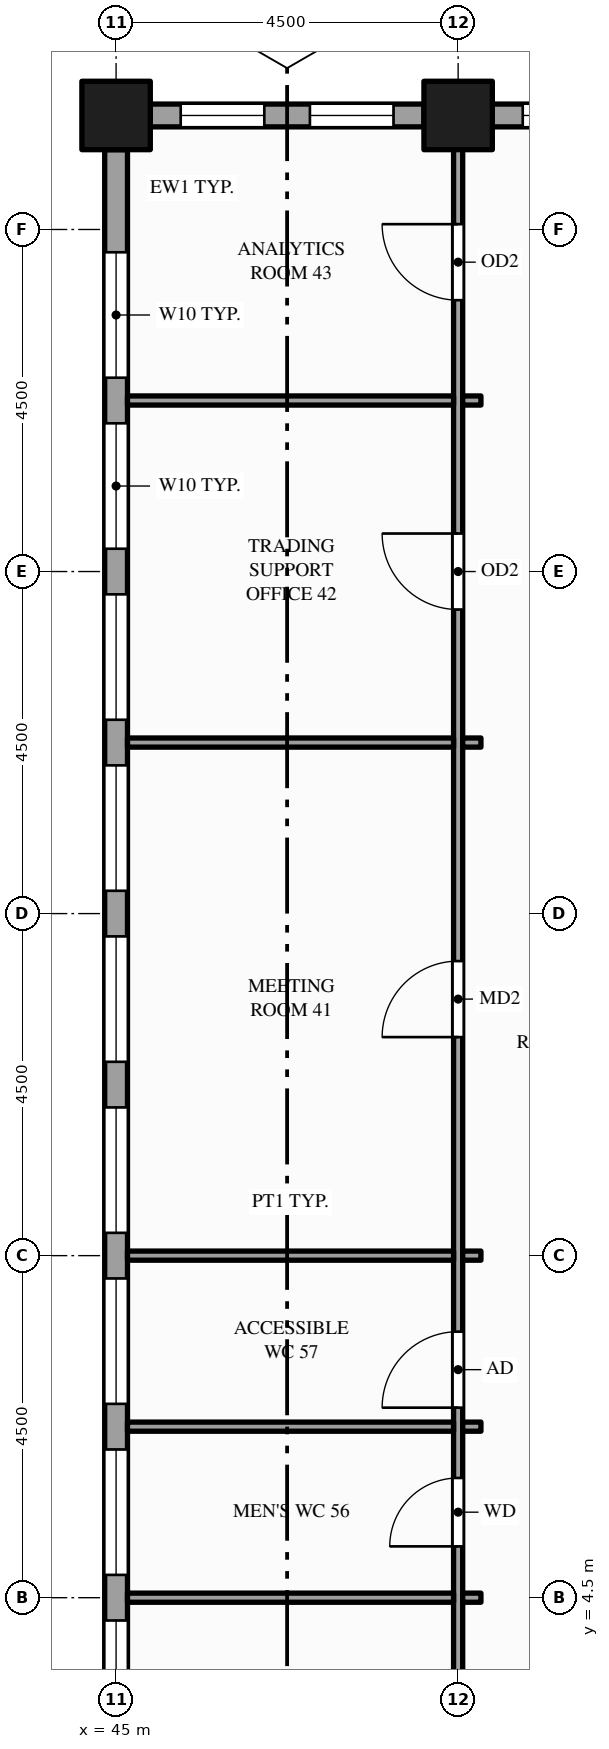
"""IFC4 building model, lengths in metres.
Left out: names, types, materials, properties, quantities, classifications, styles, units other than length and angle.
Written with IfcOpenShell. Run it as: python <this file> out.ifc"""

import sys

from ifc_helpers import new_model, si_unit, direction, frame, frame_2d, origin, origin_2d, place, context, subcontext, project, spatial, rectangle, hollow_rectangle, extrude, element, fill, save


model = new_model("IFC4")
c1 = context("Model", 3, precision=1e-05, world=origin(), true_north=direction((0.0, 1.0)))
c2 = subcontext(c1, "Body", "Model", "MODEL_VIEW")
j1 = project(units=[si_unit("LENGTHUNIT", "METRE"), si_unit("PLANEANGLEUNIT", "RADIAN")], contexts=[c1])
p1 = place(None, origin())
s1 = spatial("IfcSite", under=j1, at=p1, CompositionType="ELEMENT")
p2 = place(p1, origin())
s2 = spatial("IfcBuilding", under=s1, at=p2, CompositionType="ELEMENT")
p3 = place(p2, frame((0.0, 0.0, 143.0)))
s3 = spatial("IfcBuildingStorey", under=s2, at=p3, CompositionType="ELEMENT", Elevation=143.0)
for number, where, z_axis, x_axis in (
    (1, (45.0, 24.0, -0.15), (0.0, 0.0, 1.0), (1.0, 0.0, 0.0)),
    (2, (49.5, 24.0, -0.15), (0.0, 0.0, 1.0), (1.0, 0.0, 0.0)),
):
    element("IfcColumn", number, at=place(p3, frame(where, z_axis=z_axis, x_axis=x_axis)), inside=s3, PredefinedType="COLUMN", context=c2, shape_type="SweptSolid", body=[
        extrude(hollow_rectangle(XDim=0.9, YDim=0.9, WallThickness=0.045, at=origin_2d()), origin(), (0.0, 0.0, 1.0), 4.0),
    ])
p4 = place(p3, frame((53.55, 24.0, 0.0), z_axis=(0.0, 0.0, 1.0), x_axis=(-1.0, 0.0, 0.0)))
e3 = element("IfcWall", 3, at=p4, inside=s3, PredefinedType="STANDARD", context=c2, shape_type="SweptSolid", body=[
    extrude(rectangle(XDim=3.6, YDim=0.3, at=frame_2d((1.8, 0.0))), origin(), (0.0, 0.0, 1.0), 2.87),
])
p5 = place(p4, frame((0.4, 0.0, 0.9)))
e4 = element("IfcOpeningElement", 4, at=p5, cuts=e3, PredefinedType="OPENING", context=c2, shape_type="SweptSolid", body=[
    extrude(rectangle(XDim=1.1, YDim=1.75, at=frame_2d((0.55, 0.875))), frame((0.0, 0.16, 0.0), z_axis=(0.0, -1.0, 0.0), x_axis=(1.0, 0.0, 0.0)), (0.0, 0.0, 1.0), 0.32),
])
p6 = place(p4, frame((2.1, 0.0, 0.9)))
e5 = element("IfcOpeningElement", 5, at=p6, cuts=e3, PredefinedType="OPENING", context=c2, shape_type="SweptSolid", body=[
    extrude(rectangle(XDim=1.1, YDim=1.75, at=frame_2d((0.55, 0.875))), frame((0.0, 0.16, 0.0), z_axis=(0.0, -1.0, 0.0), x_axis=(1.0, 0.0, 0.0)), (0.0, 0.0, 1.0), 0.32),
])
p7 = place(p3, frame((49.05, 24.0, 0.0), z_axis=(0.0, 0.0, 1.0), x_axis=(-1.0, 0.0, 0.0)))
e6 = element("IfcWall", 6, at=p7, inside=s3, PredefinedType="STANDARD", context=c2, shape_type="SweptSolid", body=[
    extrude(rectangle(XDim=3.6, YDim=0.3, at=frame_2d((1.8, 0.0))), origin(), (0.0, 0.0, 1.0), 2.87),
])
p8 = place(p7, frame((0.4, 0.0, 0.9)))
e7 = element("IfcOpeningElement", 7, at=p8, cuts=e6, PredefinedType="OPENING", context=c2, shape_type="SweptSolid", body=[
    extrude(rectangle(XDim=1.1, YDim=1.75, at=frame_2d((0.55, 0.875))), frame((0.0, 0.16, 0.0), z_axis=(0.0, -1.0, 0.0), x_axis=(1.0, 0.0, 0.0)), (0.0, 0.0, 1.0), 0.32),
])
p9 = place(p7, frame((2.1, 0.0, 0.9)))
e8 = element("IfcOpeningElement", 8, at=p9, cuts=e6, PredefinedType="OPENING", context=c2, shape_type="SweptSolid", body=[
    extrude(rectangle(XDim=1.1, YDim=1.75, at=frame_2d((0.55, 0.875))), frame((0.0, 0.16, 0.0), z_axis=(0.0, -1.0, 0.0), x_axis=(1.0, 0.0, 0.0)), (0.0, 0.0, 1.0), 0.32),
])
p10 = place(p3, frame((45.0, 23.55, 0.0), z_axis=(0.0, 0.0, 1.0), x_axis=(0.0, -1.0, 0.0)))
e9 = element("IfcWall", 9, at=p10, inside=s3, PredefinedType="STANDARD", context=c2, shape_type="SweptSolid", body=[
    extrude(rectangle(XDim=21.6, YDim=0.3, at=frame_2d((10.8, 0.0))), origin(), (0.0, 0.0, 1.0), 3.149),
])
p11 = place(p10, frame((1.35, 0.0, 0.9)))
e10 = element("IfcOpeningElement", 10, at=p11, cuts=e9, PredefinedType="OPENING", context=c2, shape_type="SweptSolid", body=[
    extrude(rectangle(XDim=1.65, YDim=2.0, at=frame_2d((0.825, 1.0))), frame((0.0, 0.16, 0.0), z_axis=(0.0, -1.0, 0.0), x_axis=(1.0, 0.0, 0.0)), (0.0, 0.0, 1.0), 0.32),
])
p12 = place(p10, frame((3.6, 0.0, 0.9)))
e11 = element("IfcOpeningElement", 11, at=p12, cuts=e9, PredefinedType="OPENING", context=c2, shape_type="SweptSolid", body=[
    extrude(rectangle(XDim=1.65, YDim=2.0, at=frame_2d((0.825, 1.0))), frame((0.0, 0.16, 0.0), z_axis=(0.0, -1.0, 0.0), x_axis=(1.0, 0.0, 0.0)), (0.0, 0.0, 1.0), 0.32),
])
p13 = place(p10, frame((5.85, 0.0, 0.9)))
e12 = element("IfcOpeningElement", 12, at=p13, cuts=e9, PredefinedType="OPENING", context=c2, shape_type="SweptSolid", body=[
    extrude(rectangle(XDim=1.65, YDim=2.0, at=frame_2d((0.825, 1.0))), frame((0.0, 0.16, 0.0), z_axis=(0.0, -1.0, 0.0), x_axis=(1.0, 0.0, 0.0)), (0.0, 0.0, 1.0), 0.32),
])
p14 = place(p10, frame((8.1, 0.0, 0.9)))
e13 = element("IfcOpeningElement", 13, at=p14, cuts=e9, PredefinedType="OPENING", context=c2, shape_type="SweptSolid", body=[
    extrude(rectangle(XDim=1.65, YDim=2.0, at=frame_2d((0.825, 1.0))), frame((0.0, 0.16, 0.0), z_axis=(0.0, -1.0, 0.0), x_axis=(1.0, 0.0, 0.0)), (0.0, 0.0, 1.0), 0.32),
])
p15 = place(p10, frame((10.35, 0.0, 0.9)))
e14 = element("IfcOpeningElement", 14, at=p15, cuts=e9, PredefinedType="OPENING", context=c2, shape_type="SweptSolid", body=[
    extrude(rectangle(XDim=1.65, YDim=2.0, at=frame_2d((0.825, 1.0))), frame((0.0, 0.16, 0.0), z_axis=(0.0, -1.0, 0.0), x_axis=(1.0, 0.0, 0.0)), (0.0, 0.0, 1.0), 0.32),
])
p16 = place(p10, frame((12.6, 0.0, 0.9)))
e15 = element("IfcOpeningElement", 15, at=p16, cuts=e9, PredefinedType="OPENING", context=c2, shape_type="SweptSolid", body=[
    extrude(rectangle(XDim=1.65, YDim=2.0, at=frame_2d((0.825, 1.0))), frame((0.0, 0.16, 0.0), z_axis=(0.0, -1.0, 0.0), x_axis=(1.0, 0.0, 0.0)), (0.0, 0.0, 1.0), 0.32),
])
p17 = place(p10, frame((14.85, 0.0, 0.9)))
e16 = element("IfcOpeningElement", 16, at=p17, cuts=e9, PredefinedType="OPENING", context=c2, shape_type="SweptSolid", body=[
    extrude(rectangle(XDim=1.65, YDim=2.0, at=frame_2d((0.825, 1.0))), frame((0.0, 0.16, 0.0), z_axis=(0.0, -1.0, 0.0), x_axis=(1.0, 0.0, 0.0)), (0.0, 0.0, 1.0), 0.32),
])
p18 = place(p10, frame((17.1, 0.0, 0.9)))
e17 = element("IfcOpeningElement", 17, at=p18, cuts=e9, PredefinedType="OPENING", context=c2, shape_type="SweptSolid", body=[
    extrude(rectangle(XDim=1.65, YDim=2.0, at=frame_2d((0.825, 1.0))), frame((0.0, 0.16, 0.0), z_axis=(0.0, -1.0, 0.0), x_axis=(1.0, 0.0, 0.0)), (0.0, 0.0, 1.0), 0.32),
])
p19 = place(p10, frame((19.35, 0.0, 0.9)))
e18 = element("IfcOpeningElement", 18, at=p19, cuts=e9, PredefinedType="OPENING", context=c2, shape_type="SweptSolid", body=[
    extrude(rectangle(XDim=1.65, YDim=2.0, at=frame_2d((0.825, 1.0))), frame((0.0, 0.16, 0.0), z_axis=(0.0, -1.0, 0.0), x_axis=(1.0, 0.0, 0.0)), (0.0, 0.0, 1.0), 0.32),
])
p20 = place(p3, frame((49.5, 1.65, 0.0), z_axis=(0.0, 0.0, 1.0), x_axis=(0.0, 1.0, 0.0)))
e19 = element("IfcWall", 19, at=p20, inside=s3, PredefinedType="PARTITIONING", context=c2, shape_type="SweptSolid", body=[
    extrude(rectangle(XDim=22.2, YDim=0.12, at=frame_2d((11.1, 0.0))), origin(), (0.0, 0.0, 1.0), 2.87),
])
p21 = place(p20, frame((0.85, 0.0, 0.0)))
e20 = element("IfcOpeningElement", 20, at=p21, cuts=e19, PredefinedType="OPENING", context=c2, shape_type="SweptSolid", body=[
    extrude(rectangle(XDim=0.9, YDim=2.1, at=frame_2d((0.45, 1.05))), frame((0.0, 0.07, 0.0), z_axis=(0.0, -1.0, 0.0), x_axis=(1.0, 0.0, 0.0)), (0.0, 0.0, 1.0), 0.14),
])
p22 = place(p20, frame((3.525, 0.0, 0.0)))
e21 = element("IfcOpeningElement", 21, at=p22, cuts=e19, PredefinedType="OPENING", context=c2, shape_type="SweptSolid", body=[
    extrude(rectangle(XDim=0.9, YDim=2.1, at=frame_2d((0.45, 1.05))), frame((0.0, 0.07, 0.0), z_axis=(0.0, -1.0, 0.0), x_axis=(1.0, 0.0, 0.0)), (0.0, 0.0, 1.0), 0.14),
])
p23 = place(p20, frame((5.35, 0.0, 0.0)))
e22 = element("IfcOpeningElement", 22, at=p23, cuts=e19, PredefinedType="OPENING", context=c2, shape_type="SweptSolid", body=[
    extrude(rectangle(XDim=1.0, YDim=2.1, at=frame_2d((0.5, 1.05))), frame((0.0, 0.07, 0.0), z_axis=(0.0, -1.0, 0.0), x_axis=(1.0, 0.0, 0.0)), (0.0, 0.0, 1.0), 0.14),
])
p24 = place(p20, frame((10.225, 0.0, 0.0)))
e23 = element("IfcOpeningElement", 23, at=p24, cuts=e19, PredefinedType="OPENING", context=c2, shape_type="SweptSolid", body=[
    extrude(rectangle(XDim=1.0, YDim=2.1, at=frame_2d((0.5, 1.05))), frame((0.0, 0.07, 0.0), z_axis=(0.0, -1.0, 0.0), x_axis=(1.0, 0.0, 0.0)), (0.0, 0.0, 1.0), 0.14),
])
p25 = place(p20, frame((15.85, 0.0, 0.0)))
e24 = element("IfcOpeningElement", 24, at=p25, cuts=e19, PredefinedType="OPENING", context=c2, shape_type="SweptSolid", body=[
    extrude(rectangle(XDim=1.0, YDim=2.1, at=frame_2d((0.5, 1.05))), frame((0.0, 0.07, 0.0), z_axis=(0.0, -1.0, 0.0), x_axis=(1.0, 0.0, 0.0)), (0.0, 0.0, 1.0), 0.14),
])
p26 = place(p20, frame((19.92, 0.0, 0.0)))
e25 = element("IfcOpeningElement", 25, at=p26, cuts=e19, PredefinedType="OPENING", context=c2, shape_type="SweptSolid", body=[
    extrude(rectangle(XDim=1.0, YDim=2.1, at=frame_2d((0.5, 1.05))), frame((0.0, 0.07, 0.0), z_axis=(0.0, -1.0, 0.0), x_axis=(1.0, 0.0, 0.0)), (0.0, 0.0, 1.0), 0.14),
])
p27 = place(p3, frame((45.15, 4.5, 0.0), z_axis=(0.0, 0.0, 1.0), x_axis=(1.0, 0.0, 0.0)))
e26 = element("IfcWall", 26, at=p27, inside=s3, PredefinedType="PARTITIONING", context=c2, shape_type="SweptSolid", body=[
    extrude(rectangle(XDim=4.29, YDim=0.12, at=frame_2d((2.145, 0.0))), origin(), (0.0, 0.0, 1.0), 2.87),
])
p28 = place(p3, frame((49.56, 4.5, 0.0), z_axis=(0.0, 0.0, 1.0), x_axis=(1.0, 0.0, 0.0)))
e27 = element("IfcWall", 27, at=p28, inside=s3, PredefinedType="PARTITIONING", context=c2, shape_type="SweptSolid", body=[
    extrude(rectangle(XDim=0.24, YDim=0.12, at=frame_2d((0.12, 0.0))), origin(), (0.0, 0.0, 1.0), 2.87),
])
p29 = place(p3, frame((45.15, 6.75, 0.0), z_axis=(0.0, 0.0, 1.0), x_axis=(1.0, 0.0, 0.0)))
e28 = element("IfcWall", 28, at=p29, inside=s3, PredefinedType="PARTITIONING", context=c2, shape_type="SweptSolid", body=[
    extrude(rectangle(XDim=4.29, YDim=0.12, at=frame_2d((2.145, 0.0))), origin(), (0.0, 0.0, 1.0), 2.87),
])
p30 = place(p3, frame((49.56, 6.75, 0.0), z_axis=(0.0, 0.0, 1.0), x_axis=(1.0, 0.0, 0.0)))
e29 = element("IfcWall", 29, at=p30, inside=s3, PredefinedType="PARTITIONING", context=c2, shape_type="SweptSolid", body=[
    extrude(rectangle(XDim=0.24, YDim=0.12, at=frame_2d((0.12, 0.0))), origin(), (0.0, 0.0, 1.0), 2.87),
])
p31 = place(p3, frame((45.15, 9.0, 0.0), z_axis=(0.0, 0.0, 1.0), x_axis=(1.0, 0.0, 0.0)))
e30 = element("IfcWall", 30, at=p31, inside=s3, PredefinedType="PARTITIONING", context=c2, shape_type="SweptSolid", body=[
    extrude(rectangle(XDim=4.29, YDim=0.12, at=frame_2d((2.145, 0.0))), origin(), (0.0, 0.0, 1.0), 2.87),
])
p32 = place(p3, frame((49.56, 9.0, 0.0), z_axis=(0.0, 0.0, 1.0), x_axis=(1.0, 0.0, 0.0)))
e31 = element("IfcWall", 31, at=p32, inside=s3, PredefinedType="PARTITIONING", context=c2, shape_type="SweptSolid", body=[
    extrude(rectangle(XDim=0.24, YDim=0.12, at=frame_2d((0.12, 0.0))), origin(), (0.0, 0.0, 1.0), 2.87),
])
p33 = place(p3, frame((45.15, 15.75, 0.0), z_axis=(0.0, 0.0, 1.0), x_axis=(1.0, 0.0, 0.0)))
e32 = element("IfcWall", 32, at=p33, inside=s3, PredefinedType="PARTITIONING", context=c2, shape_type="SweptSolid", body=[
    extrude(rectangle(XDim=4.29, YDim=0.12, at=frame_2d((2.145, 0.0))), origin(), (0.0, 0.0, 1.0), 2.87),
])
p34 = place(p3, frame((49.56, 15.75, 0.0), z_axis=(0.0, 0.0, 1.0), x_axis=(1.0, 0.0, 0.0)))
e33 = element("IfcWall", 33, at=p34, inside=s3, PredefinedType="PARTITIONING", context=c2, shape_type="SweptSolid", body=[
    extrude(rectangle(XDim=0.24, YDim=0.12, at=frame_2d((0.12, 0.0))), origin(), (0.0, 0.0, 1.0), 2.87),
])
p35 = place(p3, frame((45.15, 20.25, 0.0), z_axis=(0.0, 0.0, 1.0), x_axis=(1.0, 0.0, 0.0)))
e34 = element("IfcWall", 34, at=p35, inside=s3, PredefinedType="PARTITIONING", context=c2, shape_type="SweptSolid", body=[
    extrude(rectangle(XDim=4.29, YDim=0.12, at=frame_2d((2.145, 0.0))), origin(), (0.0, 0.0, 1.0), 2.87),
])
p36 = place(p3, frame((49.56, 20.25, 0.0), z_axis=(0.0, 0.0, 1.0), x_axis=(1.0, 0.0, 0.0)))
e35 = element("IfcWall", 35, at=p36, inside=s3, PredefinedType="PARTITIONING", context=c2, shape_type="SweptSolid", body=[
    extrude(rectangle(XDim=0.24, YDim=0.12, at=frame_2d((0.12, 0.0))), origin(), (0.0, 0.0, 1.0), 2.87),
])
p37 = place(p6, origin())
e36 = element("IfcWindow", 36, at=p37, inside=s3, PartitioningType="SINGLE_PANEL", PredefinedType="WINDOW", context=c2, shape_type="SweptSolid", body=[
    extrude(rectangle(XDim=1.1, YDim=1.75, at=frame_2d((0.55, 0.875))), frame((0.0, 0.03, 0.0), z_axis=(0.0, -1.0, 0.0), x_axis=(1.0, 0.0, 0.0)), (0.0, 0.0, 1.0), 0.06),
])
fill(e5, e36)
p38 = place(p8, origin())
e37 = element("IfcWindow", 37, at=p38, inside=s3, PartitioningType="SINGLE_PANEL", PredefinedType="WINDOW", context=c2, shape_type="SweptSolid", body=[
    extrude(rectangle(XDim=1.1, YDim=1.75, at=frame_2d((0.55, 0.875))), frame((0.0, 0.03, 0.0), z_axis=(0.0, -1.0, 0.0), x_axis=(1.0, 0.0, 0.0)), (0.0, 0.0, 1.0), 0.06),
])
fill(e7, e37)
p39 = place(p9, origin())
e38 = element("IfcWindow", 38, at=p39, inside=s3, PartitioningType="SINGLE_PANEL", PredefinedType="WINDOW", context=c2, shape_type="SweptSolid", body=[
    extrude(rectangle(XDim=1.1, YDim=1.75, at=frame_2d((0.55, 0.875))), frame((0.0, 0.03, 0.0), z_axis=(0.0, -1.0, 0.0), x_axis=(1.0, 0.0, 0.0)), (0.0, 0.0, 1.0), 0.06),
])
fill(e8, e38)
p40 = place(p11, origin())
e39 = element("IfcWindow", 39, at=p40, inside=s3, PartitioningType="SINGLE_PANEL", PredefinedType="WINDOW", context=c2, shape_type="SweptSolid", body=[
    extrude(rectangle(XDim=1.65, YDim=2.0, at=frame_2d((0.825, 1.0))), frame((0.0, 0.03, 0.0), z_axis=(0.0, -1.0, 0.0), x_axis=(1.0, 0.0, 0.0)), (0.0, 0.0, 1.0), 0.06),
])
fill(e10, e39)
p41 = place(p12, origin())
e40 = element("IfcWindow", 40, at=p41, inside=s3, PartitioningType="SINGLE_PANEL", PredefinedType="WINDOW", context=c2, shape_type="SweptSolid", body=[
    extrude(rectangle(XDim=1.65, YDim=2.0, at=frame_2d((0.825, 1.0))), frame((0.0, 0.03, 0.0), z_axis=(0.0, -1.0, 0.0), x_axis=(1.0, 0.0, 0.0)), (0.0, 0.0, 1.0), 0.06),
])
fill(e11, e40)
p42 = place(p13, origin())
e41 = element("IfcWindow", 41, at=p42, inside=s3, PartitioningType="SINGLE_PANEL", PredefinedType="WINDOW", context=c2, shape_type="SweptSolid", body=[
    extrude(rectangle(XDim=1.65, YDim=2.0, at=frame_2d((0.825, 1.0))), frame((0.0, 0.03, 0.0), z_axis=(0.0, -1.0, 0.0), x_axis=(1.0, 0.0, 0.0)), (0.0, 0.0, 1.0), 0.06),
])
fill(e12, e41)
p43 = place(p14, origin())
e42 = element("IfcWindow", 42, at=p43, inside=s3, PartitioningType="SINGLE_PANEL", PredefinedType="WINDOW", context=c2, shape_type="SweptSolid", body=[
    extrude(rectangle(XDim=1.65, YDim=2.0, at=frame_2d((0.825, 1.0))), frame((0.0, 0.03, 0.0), z_axis=(0.0, -1.0, 0.0), x_axis=(1.0, 0.0, 0.0)), (0.0, 0.0, 1.0), 0.06),
])
fill(e13, e42)
p44 = place(p15, origin())
e43 = element("IfcWindow", 43, at=p44, inside=s3, PartitioningType="SINGLE_PANEL", PredefinedType="WINDOW", context=c2, shape_type="SweptSolid", body=[
    extrude(rectangle(XDim=1.65, YDim=2.0, at=frame_2d((0.825, 1.0))), frame((0.0, 0.03, 0.0), z_axis=(0.0, -1.0, 0.0), x_axis=(1.0, 0.0, 0.0)), (0.0, 0.0, 1.0), 0.06),
])
fill(e14, e43)
p45 = place(p16, origin())
e44 = element("IfcWindow", 44, at=p45, inside=s3, PartitioningType="SINGLE_PANEL", PredefinedType="WINDOW", context=c2, shape_type="SweptSolid", body=[
    extrude(rectangle(XDim=1.65, YDim=2.0, at=frame_2d((0.825, 1.0))), frame((0.0, 0.03, 0.0), z_axis=(0.0, -1.0, 0.0), x_axis=(1.0, 0.0, 0.0)), (0.0, 0.0, 1.0), 0.06),
])
fill(e15, e44)
p46 = place(p17, origin())
e45 = element("IfcWindow", 45, at=p46, inside=s3, PartitioningType="SINGLE_PANEL", PredefinedType="WINDOW", context=c2, shape_type="SweptSolid", body=[
    extrude(rectangle(XDim=1.65, YDim=2.0, at=frame_2d((0.825, 1.0))), frame((0.0, 0.03, 0.0), z_axis=(0.0, -1.0, 0.0), x_axis=(1.0, 0.0, 0.0)), (0.0, 0.0, 1.0), 0.06),
])
fill(e16, e45)
p47 = place(p18, origin())
e46 = element("IfcWindow", 46, at=p47, inside=s3, PartitioningType="SINGLE_PANEL", PredefinedType="WINDOW", context=c2, shape_type="SweptSolid", body=[
    extrude(rectangle(XDim=1.65, YDim=2.0, at=frame_2d((0.825, 1.0))), frame((0.0, 0.03, 0.0), z_axis=(0.0, -1.0, 0.0), x_axis=(1.0, 0.0, 0.0)), (0.0, 0.0, 1.0), 0.06),
])
fill(e17, e46)
p48 = place(p19, origin())
e47 = element("IfcWindow", 47, at=p48, inside=s3, PartitioningType="SINGLE_PANEL", PredefinedType="WINDOW", context=c2, shape_type="SweptSolid", body=[
    extrude(rectangle(XDim=1.65, YDim=2.0, at=frame_2d((0.825, 1.0))), frame((0.0, 0.03, 0.0), z_axis=(0.0, -1.0, 0.0), x_axis=(1.0, 0.0, 0.0)), (0.0, 0.0, 1.0), 0.06),
])
fill(e18, e47)
p49 = place(p22, origin())
e48 = element("IfcDoor", 48, at=p49, inside=s3, OperationType="SINGLE_SWING_LEFT", PredefinedType="DOOR", context=c2, shape_type="SweptSolid", body=[
    extrude(rectangle(XDim=0.9, YDim=2.1, at=frame_2d((0.45, 1.05))), frame((0.0, 0.025, 0.0), z_axis=(0.0, -1.0, 0.0), x_axis=(1.0, 0.0, 0.0)), (0.0, 0.0, 1.0), 0.05),
])
fill(e21, e48)
p50 = place(p23, origin())
e49 = element("IfcDoor", 49, at=p50, inside=s3, OperationType="SINGLE_SWING_LEFT", PredefinedType="DOOR", context=c2, shape_type="SweptSolid", body=[
    extrude(rectangle(XDim=1.0, YDim=2.1, at=frame_2d((0.5, 1.05))), frame((0.0, 0.025, 0.0), z_axis=(0.0, -1.0, 0.0), x_axis=(1.0, 0.0, 0.0)), (0.0, 0.0, 1.0), 0.05),
])
fill(e22, e49)
p51 = place(p24, origin())
e50 = element("IfcDoor", 50, at=p51, inside=s3, OperationType="SINGLE_SWING_LEFT", PredefinedType="DOOR", context=c2, shape_type="SweptSolid", body=[
    extrude(rectangle(XDim=1.0, YDim=2.1, at=frame_2d((0.5, 1.05))), frame((0.0, 0.025, 0.0), z_axis=(0.0, -1.0, 0.0), x_axis=(1.0, 0.0, 0.0)), (0.0, 0.0, 1.0), 0.05),
])
fill(e23, e50)
p52 = place(p25, origin())
e51 = element("IfcDoor", 51, at=p52, inside=s3, OperationType="SINGLE_SWING_RIGHT", PredefinedType="DOOR", context=c2, shape_type="SweptSolid", body=[
    extrude(rectangle(XDim=1.0, YDim=2.1, at=frame_2d((0.5, 1.05))), frame((0.0, 0.025, 0.0), z_axis=(0.0, -1.0, 0.0), x_axis=(1.0, 0.0, 0.0)), (0.0, 0.0, 1.0), 0.05),
])
fill(e24, e51)
p53 = place(p26, origin())
e52 = element("IfcDoor", 52, at=p53, inside=s3, OperationType="SINGLE_SWING_RIGHT", PredefinedType="DOOR", context=c2, shape_type="SweptSolid", body=[
    extrude(rectangle(XDim=1.0, YDim=2.1, at=frame_2d((0.5, 1.05))), frame((0.0, 0.025, 0.0), z_axis=(0.0, -1.0, 0.0), x_axis=(1.0, 0.0, 0.0)), (0.0, 0.0, 1.0), 0.05),
])
fill(e25, e52)
save(model, sys.argv[1])
